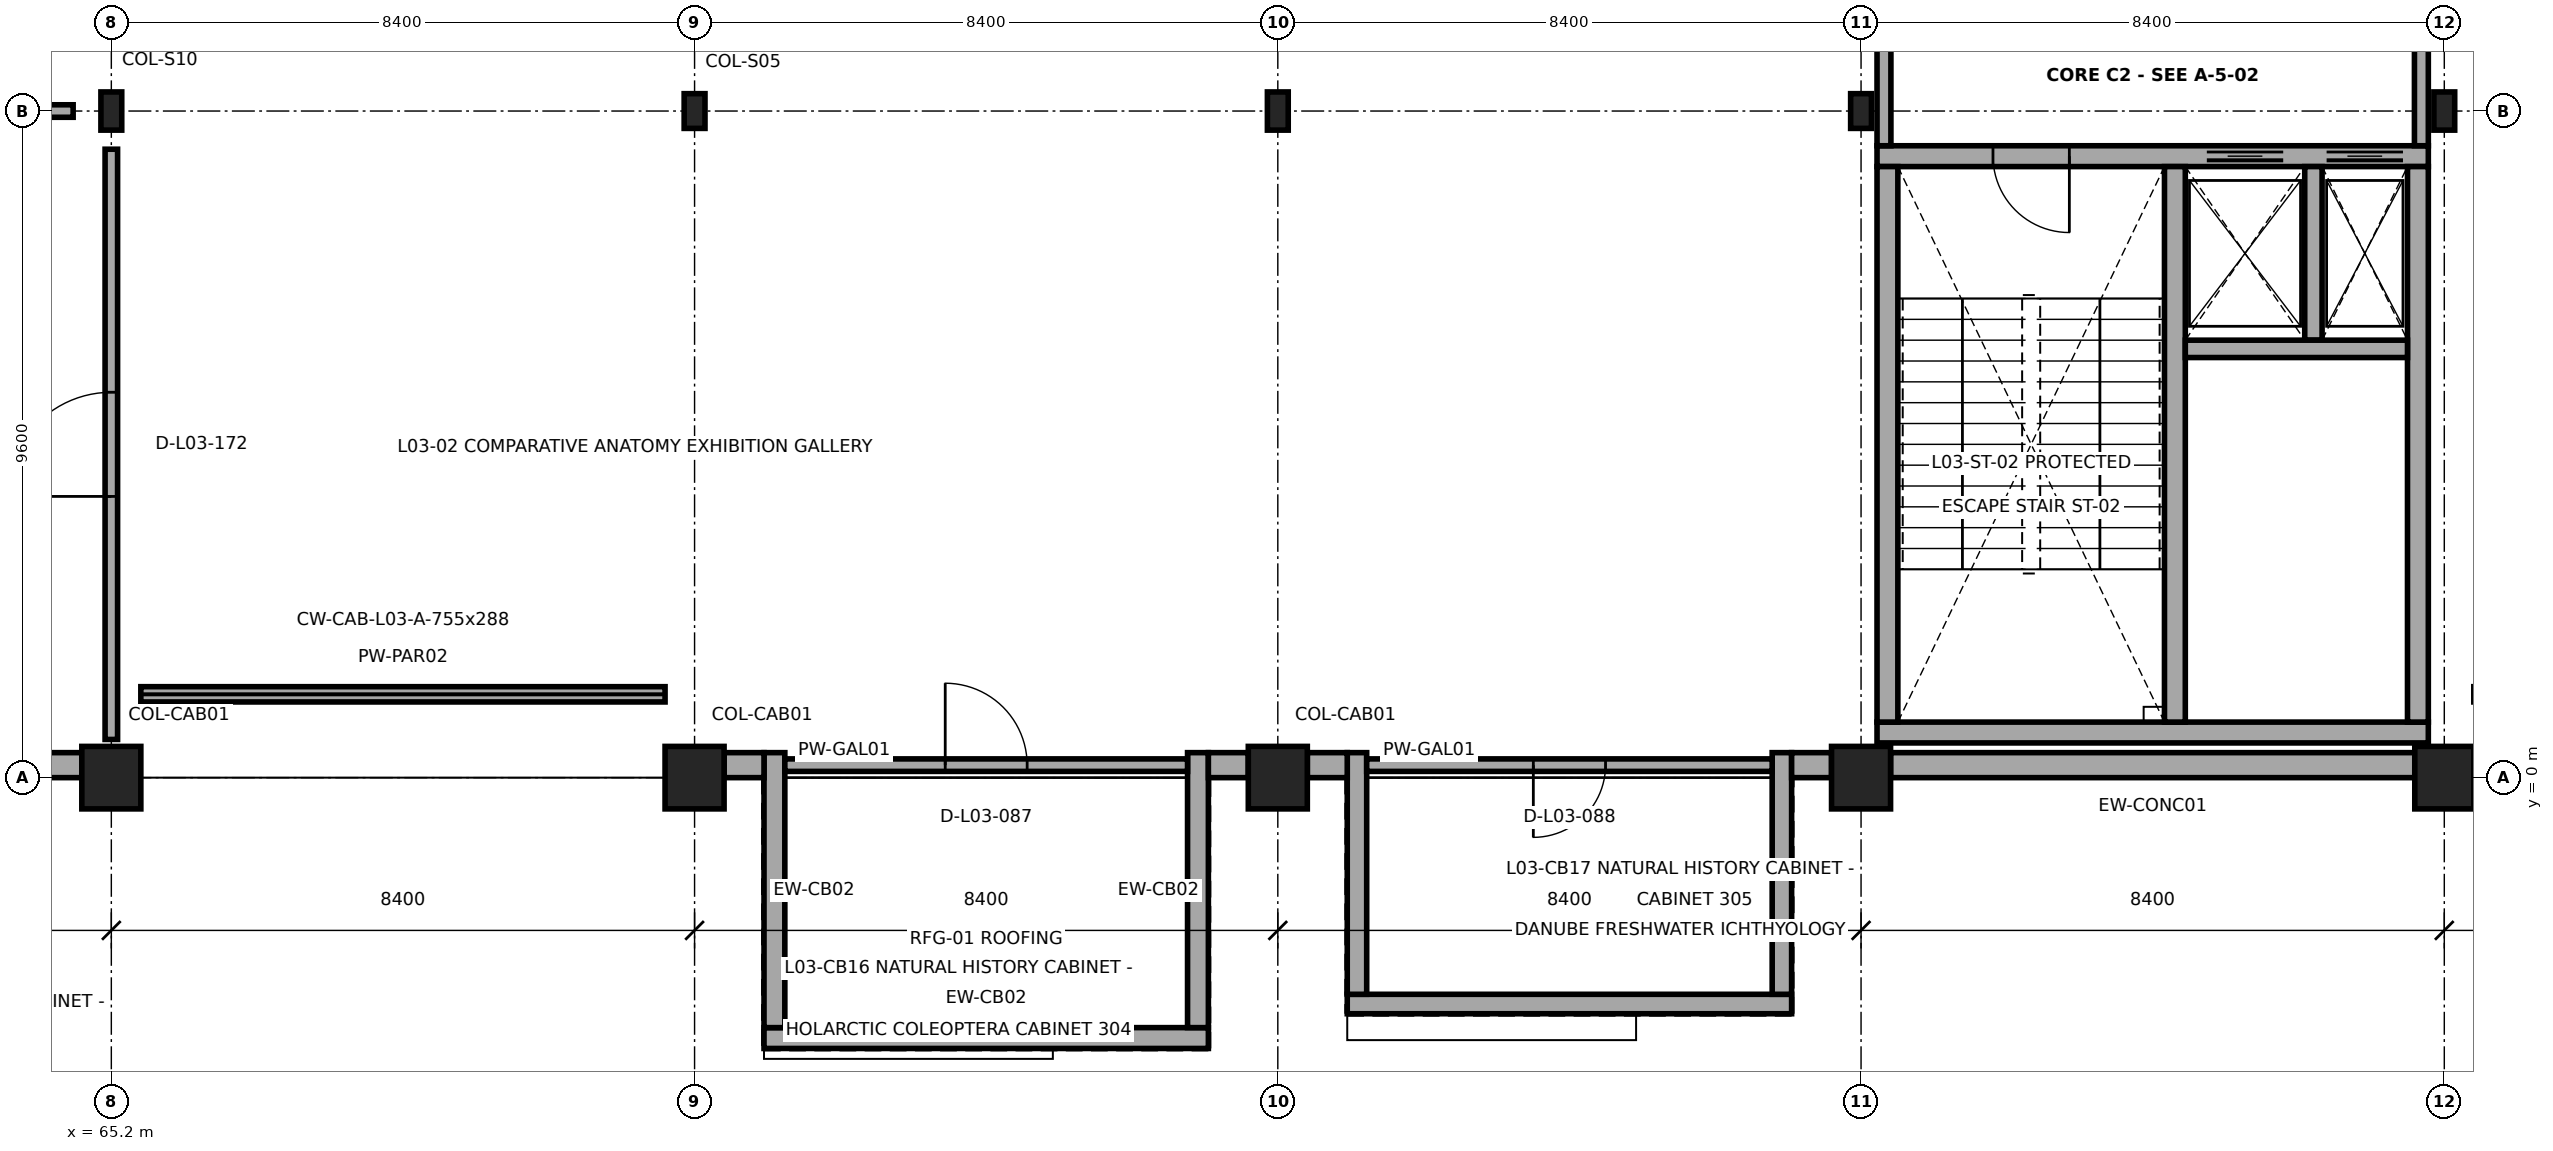
"""IFC4 building model, lengths in metres.
Left out: names, types, materials, properties, quantities, classifications, styles, units other than length and angle.
Written with IfcOpenShell. Run it as: python <this file> out.ifc"""

import sys

from ifc_helpers import new_model, si_unit, direction, frame, frame_2d, origin, origin_2d, place, context, subcontext, project, spatial, rectangle, i_section, extrude, element, fill, save


model = new_model("IFC4")
c1 = context("Model", 3, precision=1e-05, world=origin(), true_north=direction((0.0, 1.0)))
c2 = subcontext(c1, "Body", "Model", "MODEL_VIEW")
j1 = project(units=[si_unit("LENGTHUNIT", "METRE"), si_unit("PLANEANGLEUNIT", "RADIAN")], contexts=[c1])
p1 = place(None, origin())
s1 = spatial("IfcSite", under=j1, at=p1, CompositionType="ELEMENT")
p2 = place(p1, origin())
s2 = spatial("IfcBuilding", under=s1, at=p2, CompositionType="ELEMENT")
p3 = place(p2, frame((0.0, 0.0, 17.4)))
s3 = spatial("IfcBuildingStorey", under=s2, at=p3, CompositionType="ELEMENT", Elevation=17.4)
p4 = place(p3, frame((65.2, 0.0, 0.0), z_axis=(0.0, 0.0, 1.0), x_axis=(1.0, 0.0, 0.0)))
e1 = element("IfcColumn", 1, at=p4, inside=s3, PredefinedType="COLUMN", context=c2, shape_type="SweptSolid", body=[
    extrude(rectangle(XDim=0.85, YDim=0.9, at=origin_2d()), origin(), (0.0, 0.0, 1.0), 4.5),
])
p5 = place(p3, frame((65.2, 9.6, 0.0), z_axis=(0.0, 0.0, 1.0), x_axis=(1.0, 0.0, 0.0)))
e2 = element("IfcColumn", 2, at=p5, inside=s3, PredefinedType="COLUMN", context=c2, shape_type="SweptSolid", body=[
    extrude(i_section(OverallWidth=0.3, OverallDepth=0.55, WebThickness=0.015, FlangeThickness=0.029, FilletRadius=0.027, at=origin_2d()), origin(), (0.0, 0.0, 1.0), 4.5),
])
p6 = place(p3, frame((73.6, 0.0, 0.0), z_axis=(0.0, 0.0, 1.0), x_axis=(1.0, 0.0, 0.0)))
e3 = element("IfcColumn", 3, at=p6, inside=s3, PredefinedType="COLUMN", context=c2, shape_type="SweptSolid", body=[
    extrude(rectangle(XDim=0.85, YDim=0.9, at=origin_2d()), origin(), (0.0, 0.0, 1.0), 4.5),
])
p7 = place(p3, frame((73.6, 9.6, 0.0), z_axis=(0.0, 0.0, 1.0), x_axis=(1.0, 0.0, 0.0)))
e4 = element("IfcColumn", 4, at=p7, inside=s3, PredefinedType="COLUMN", context=c2, shape_type="SweptSolid", body=[
    extrude(i_section(OverallWidth=0.3, OverallDepth=0.5, WebThickness=0.014, FlangeThickness=0.028, FilletRadius=0.027, at=origin_2d()), origin(), (0.0, 0.0, 1.0), 4.5),
])
p8 = place(p3, frame((82.0, 0.0, 0.0), z_axis=(0.0, 0.0, 1.0), x_axis=(1.0, 0.0, 0.0)))
e5 = element("IfcColumn", 5, at=p8, inside=s3, PredefinedType="COLUMN", context=c2, shape_type="SweptSolid", body=[
    extrude(rectangle(XDim=0.85, YDim=0.9, at=origin_2d()), origin(), (0.0, 0.0, 1.0), 4.5),
])
p9 = place(p3, frame((82.0, 9.6, 0.0), z_axis=(0.0, 0.0, 1.0), x_axis=(1.0, 0.0, 0.0)))
e6 = element("IfcColumn", 6, at=p9, inside=s3, PredefinedType="COLUMN", context=c2, shape_type="SweptSolid", body=[
    extrude(i_section(OverallWidth=0.3, OverallDepth=0.55, WebThickness=0.015, FlangeThickness=0.029, FilletRadius=0.027, at=origin_2d()), origin(), (0.0, 0.0, 1.0), 4.5),
])
p10 = place(p3, frame((90.4, 0.0, 0.0), z_axis=(0.0, 0.0, 1.0), x_axis=(1.0, 0.0, 0.0)))
e7 = element("IfcColumn", 7, at=p10, inside=s3, PredefinedType="COLUMN", context=c2, shape_type="SweptSolid", body=[
    extrude(rectangle(XDim=0.85, YDim=0.9, at=origin_2d()), origin(), (0.0, 0.0, 1.0), 4.5),
])
p11 = place(p3, frame((90.4, 9.6, 0.0), z_axis=(0.0, 0.0, 1.0), x_axis=(1.0, 0.0, 0.0)))
e8 = element("IfcColumn", 8, at=p11, inside=s3, PredefinedType="COLUMN", context=c2, shape_type="SweptSolid", body=[
    extrude(i_section(OverallWidth=0.3, OverallDepth=0.5, WebThickness=0.014, FlangeThickness=0.028, FilletRadius=0.027, at=origin_2d()), origin(), (0.0, 0.0, 1.0), 4.5),
])
p12 = place(p3, frame((98.8, 0.0, 0.0), z_axis=(0.0, 0.0, 1.0), x_axis=(1.0, 0.0, 0.0)))
e9 = element("IfcColumn", 9, at=p12, inside=s3, PredefinedType="COLUMN", context=c2, shape_type="SweptSolid", body=[
    extrude(rectangle(XDim=0.85, YDim=0.9, at=origin_2d()), origin(), (0.0, 0.0, 1.0), 4.5),
])
p13 = place(p3, frame((98.8, 9.6, 0.0), z_axis=(0.0, 0.0, 1.0), x_axis=(1.0, 0.0, 0.0)))
e10 = element("IfcColumn", 10, at=p13, inside=s3, PredefinedType="COLUMN", context=c2, shape_type="SweptSolid", body=[
    extrude(i_section(OverallWidth=0.3, OverallDepth=0.55, WebThickness=0.015, FlangeThickness=0.029, FilletRadius=0.027, at=origin_2d()), origin(), (0.0, 0.0, 1.0), 4.5),
])
p14 = place(p3, frame((74.6, -3.75, 0.0), z_axis=(0.0, 0.0, 1.0), x_axis=(1.0, 0.0, 0.0)))
e11 = element("IfcWall", 11, at=p14, inside=s3, PredefinedType="SOLIDWALL", context=c2, shape_type="SweptSolid", body=[
    extrude(rectangle(XDim=6.4, YDim=0.3, at=frame_2d((3.2, 0.0))), origin(), (0.0, 0.0, 1.0), 2.99),
])
for number, where, z_axis, x_axis in (
    (12, (74.75, 0.36, 0.0), (0.0, 0.0, 1.0), (0.0, -1.0, 0.0)),
    (13, (80.85, -3.6, 0.0), (0.0, 0.0, 1.0), (0.0, 1.0, 0.0)),
):
    element("IfcWall", number, at=place(p3, frame(where, z_axis=z_axis, x_axis=x_axis)), inside=s3, PredefinedType="SOLIDWALL", context=c2, shape_type="SweptSolid", body=[
        extrude(rectangle(XDim=3.96, YDim=0.3, at=frame_2d((1.98, 0.0))), origin(), (0.0, 0.0, 1.0), 2.99),
    ])
p15 = place(p3, frame((83.0, -3.26, 0.0), z_axis=(0.0, 0.0, 1.0), x_axis=(1.0, 0.0, 0.0)))
e14 = element("IfcWall", 14, at=p15, inside=s3, PredefinedType="SOLIDWALL", context=c2, shape_type="SweptSolid", body=[
    extrude(rectangle(XDim=6.4, YDim=0.28, at=frame_2d((3.2, 0.0))), origin(), (0.0, 0.0, 1.0), 2.99),
])
for number, where, z_axis, x_axis in (
    (15, (83.14, 0.36, 0.0), (0.0, 0.0, 1.0), (0.0, -1.0, 0.0)),
    (16, (89.26, -3.12, 0.0), (0.0, 0.0, 1.0), (0.0, 1.0, 0.0)),
):
    element("IfcWall", number, at=place(p3, frame(where, z_axis=z_axis, x_axis=x_axis)), inside=s3, PredefinedType="SOLIDWALL", context=c2, shape_type="SweptSolid", body=[
        extrude(rectangle(XDim=3.48, YDim=0.28, at=frame_2d((1.74, 0.0))), origin(), (0.0, 0.0, 1.0), 2.99),
    ])
p16 = place(p3, frame((64.2, 0.18, 0.0), z_axis=(0.0, 0.0, 1.0), x_axis=(1.0, 0.0, 0.0)))
e17 = element("IfcWall", 17, at=p16, inside=s3, PredefinedType="SOLIDWALL", context=c2, shape_type="SweptSolid", body=[
    extrude(rectangle(XDim=0.575, YDim=0.36, at=frame_2d((0.288, 0.0))), origin(), (0.0, 0.0, 1.0), 3.335),
])
p17 = place(p3, frame((65.625, 1.2, -0.002), z_axis=(0.0, 0.0, 1.0), x_axis=(1.0, 0.0, 0.0)))
e18 = element("IfcWall", 18, at=p17, inside=s3, PredefinedType="PARAPET", context=c2, shape_type="SweptSolid", body=[
    extrude(rectangle(XDim=7.55, YDim=0.22, at=frame_2d((3.775, 0.0))), origin(), (0.0, 0.0, 1.0), 0.466),
])
p18 = place(p3, frame((74.025, 0.18, 0.0), z_axis=(0.0, 0.0, 1.0), x_axis=(1.0, 0.0, 0.0)))
e19 = element("IfcWall", 19, at=p18, inside=s3, PredefinedType="SOLIDWALL", context=c2, shape_type="SweptSolid", body=[
    extrude(rectangle(XDim=0.575, YDim=0.36, at=frame_2d((0.288, 0.0))), origin(), (0.0, 0.0, 1.0), 3.335),
])
for number, where, z_axis, x_axis in (
    (20, (81.0, 0.18, 0.0), (0.0, 0.0, 1.0), (1.0, 0.0, 0.0)),
    (21, (82.425, 0.18, 0.0), (0.0, 0.0, 1.0), (1.0, 0.0, 0.0)),
):
    element("IfcWall", number, at=place(p3, frame(where, z_axis=z_axis, x_axis=x_axis)), inside=s3, PredefinedType="SOLIDWALL", context=c2, shape_type="SweptSolid", body=[
        extrude(rectangle(XDim=0.575, YDim=0.36, at=frame_2d((0.288, 0.0))), origin(), (0.0, 0.0, 1.0), 3.335),
    ])
p19 = place(p3, frame((89.4, 0.18, 0.0), z_axis=(0.0, 0.0, 1.0), x_axis=(1.0, 0.0, 0.0)))
e22 = element("IfcWall", 22, at=p19, inside=s3, PredefinedType="SOLIDWALL", context=c2, shape_type="SweptSolid", body=[
    extrude(rectangle(XDim=0.575, YDim=0.36, at=frame_2d((0.288, 0.0))), origin(), (0.0, 0.0, 1.0), 3.335),
])
p20 = place(p3, frame((90.825, 0.18, 0.0), z_axis=(0.0, 0.0, 1.0), x_axis=(1.0, 0.0, 0.0)))
e23 = element("IfcWall", 23, at=p20, inside=s3, PredefinedType="SOLIDWALL", context=c2, shape_type="SweptSolid", body=[
    extrude(rectangle(XDim=7.55, YDim=0.36, at=frame_2d((3.775, 0.0))), origin(), (0.0, 0.0, 1.0), 3.335),
])
p21 = place(p3, frame((90.63, 0.65, 0.0), z_axis=(0.0, 0.0, 1.0), x_axis=(1.0, 0.0, 0.0)))
e24 = element("IfcWall", 24, at=p21, inside=s3, PredefinedType="SHEAR", context=c2, shape_type="SweptSolid", body=[
    extrude(rectangle(XDim=7.94, YDim=0.3, at=frame_2d((3.97, 0.0))), origin(), (0.0, 0.0, 1.0), 4.25),
])
p22 = place(p3, frame((98.57, 8.95, 0.0), z_axis=(0.0, 0.0, 1.0), x_axis=(-1.0, 0.0, 0.0)))
e25 = element("IfcWall", 25, at=p22, inside=s3, PredefinedType="SHEAR", context=c2, shape_type="SweptSolid", body=[
    extrude(rectangle(XDim=7.94, YDim=0.3, at=frame_2d((3.97, 0.0))), origin(), (0.0, 0.0, 1.0), 4.25),
])
p23 = place(p22, frame((5.17, 0.0, 0.0)))
e26 = element("IfcOpeningElement", 26, at=p23, cuts=e25, PredefinedType="OPENING", context=c2, shape_type="SweptSolid", body=[
    extrude(rectangle(XDim=1.1, YDim=2.2, at=frame_2d((0.55, 1.1))), frame((0.0, 0.16, 0.0), z_axis=(0.0, -1.0, 0.0), x_axis=(1.0, 0.0, 0.0)), (0.0, 0.0, 1.0), 0.32),
])
p24 = place(p22, frame((2.09, 0.0, 0.0)))
e27 = element("IfcOpeningElement", 27, at=p24, cuts=e25, PredefinedType="OPENING", context=c2, shape_type="SweptSolid", body=[
    extrude(rectangle(XDim=1.1, YDim=2.1, at=frame_2d((0.55, 1.05))), frame((0.0, 0.16, 0.0), z_axis=(0.0, -1.0, 0.0), x_axis=(1.0, 0.0, 0.0)), (0.0, 0.0, 1.0), 0.32),
])
p25 = place(p22, frame((0.365, 0.0, 0.0)))
e28 = element("IfcOpeningElement", 28, at=p25, cuts=e25, PredefinedType="OPENING", context=c2, shape_type="SweptSolid", body=[
    extrude(rectangle(XDim=1.1, YDim=2.1, at=frame_2d((0.55, 1.05))), frame((0.0, 0.16, 0.0), z_axis=(0.0, -1.0, 0.0), x_axis=(1.0, 0.0, 0.0)), (0.0, 0.0, 1.0), 0.32),
])
for number, where, z_axis, x_axis in (
    (29, (90.78, 8.8, 0.0), (0.0, 0.0, 1.0), (0.0, -1.0, 0.0)),
    (30, (98.42, 0.8, 0.0), (0.0, 0.0, 1.0), (0.0, 1.0, 0.0)),
    (31, (94.92, 0.8, 0.0), (0.0, 0.0, 1.0), (0.0, 1.0, 0.0)),
):
    element("IfcWall", number, at=place(p3, frame(where, z_axis=z_axis, x_axis=x_axis)), inside=s3, PredefinedType="SHEAR", context=c2, shape_type="SweptSolid", body=[
        extrude(rectangle(XDim=8.0, YDim=0.3, at=frame_2d((4.0, 0.0))), origin(), (0.0, 0.0, 1.0), 4.25),
    ])
p26 = place(p3, frame((96.915, 6.3, 0.0), z_axis=(0.0, 0.0, 1.0), x_axis=(0.0, 1.0, 0.0)))
e32 = element("IfcWall", 32, at=p26, inside=s3, PredefinedType="SHEAR", context=c2, shape_type="SweptSolid", body=[
    extrude(rectangle(XDim=2.5, YDim=0.25, at=frame_2d((1.25, 0.0))), origin(), (0.0, 0.0, 1.0), 4.25),
])
p27 = place(p3, frame((95.07, 6.175, 0.0), z_axis=(0.0, 0.0, 1.0), x_axis=(1.0, 0.0, 0.0)))
e33 = element("IfcWall", 33, at=p27, inside=s3, PredefinedType="SHEAR", context=c2, shape_type="SweptSolid", body=[
    extrude(rectangle(XDim=3.2, YDim=0.25, at=frame_2d((1.6, 0.0))), origin(), (0.0, 0.0, 1.0), 4.25),
])
for number, where, z_axis, x_axis in (
    (34, (90.73, 9.1, 0.0), (0.0, 0.0, 1.0), (0.0, 1.0, 0.0)),
    (35, (98.47, 12.0, 0.0), (0.0, 0.0, 1.0), (0.0, -1.0, 0.0)),
):
    element("IfcWall", number, at=place(p3, frame(where, z_axis=z_axis, x_axis=x_axis)), inside=s3, PredefinedType="SOLIDWALL", context=c2, shape_type="SweptSolid", body=[
        extrude(rectangle(XDim=2.9, YDim=0.2, at=frame_2d((1.45, 0.0))), origin(), (0.0, 0.0, 1.0), 3.732),
    ])
p28 = place(p3, frame((74.9, 0.18, 0.0), z_axis=(0.0, 0.0, 1.0), x_axis=(1.0, 0.0, 0.0)))
e36 = element("IfcWall", 36, at=p28, inside=s3, PredefinedType="PARTITIONING", context=c2, shape_type="SweptSolid", body=[
    extrude(rectangle(XDim=5.8, YDim=0.18, at=frame_2d((2.9, 0.0))), origin(), (0.0, 0.0, 1.0), 2.99),
])
p29 = place(p28, frame((2.31, 0.0, 0.0)))
e37 = element("IfcOpeningElement", 37, at=p29, cuts=e36, PredefinedType="OPENING", context=c2, shape_type="SweptSolid", body=[
    extrude(rectangle(XDim=1.18, YDim=2.25, at=frame_2d((0.59, 1.125))), frame((0.0, 0.1, 0.0), z_axis=(0.0, -1.0, 0.0), x_axis=(1.0, 0.0, 0.0)), (0.0, 0.0, 1.0), 0.2),
])
p30 = place(p3, frame((83.28, 0.18, 0.0), z_axis=(0.0, 0.0, 1.0), x_axis=(1.0, 0.0, 0.0)))
e38 = element("IfcWall", 38, at=p30, inside=s3, PredefinedType="PARTITIONING", context=c2, shape_type="SweptSolid", body=[
    extrude(rectangle(XDim=5.84, YDim=0.18, at=frame_2d((2.92, 0.0))), origin(), (0.0, 0.0, 1.0), 2.99),
])
p31 = place(p30, frame((2.4, 0.0, 0.0)))
e39 = element("IfcOpeningElement", 39, at=p31, cuts=e38, PredefinedType="OPENING", context=c2, shape_type="SweptSolid", body=[
    extrude(rectangle(XDim=1.04, YDim=2.18, at=frame_2d((0.52, 1.09))), frame((0.0, 0.1, 0.0), z_axis=(0.0, -1.0, 0.0), x_axis=(1.0, 0.0, 0.0)), (0.0, 0.0, 1.0), 0.2),
])
p32 = place(p3, frame((57.35, 9.6, 0.0), z_axis=(0.0, 0.0, 1.0), x_axis=(1.0, 0.0, 0.0)))
e40 = element("IfcWall", 40, at=p32, inside=s3, PredefinedType="PARTITIONING", context=c2, shape_type="SweptSolid", body=[
    extrude(rectangle(XDim=7.3, YDim=0.18, at=frame_2d((3.65, 0.0))), origin(), (0.0, 0.0, 1.0), 2.992),
])
p33 = place(p32, frame((2.55, 0.0, 0.0)))
e41 = element("IfcOpeningElement", 41, at=p33, cuts=e40, PredefinedType="OPENING", context=c2, shape_type="SweptSolid", body=[
    extrude(rectangle(XDim=2.2, YDim=2.6, at=frame_2d((1.1, 1.3))), frame((0.0, 0.1, 0.0), z_axis=(0.0, -1.0, 0.0), x_axis=(1.0, 0.0, 0.0)), (0.0, 0.0, 1.0), 0.2),
])
p34 = place(p3, frame((65.2, 0.55, 0.0), z_axis=(0.0, 0.0, 1.0), x_axis=(0.0, 1.0, 0.0)))
e42 = element("IfcWall", 42, at=p34, inside=s3, PredefinedType="PARTITIONING", context=c2, shape_type="SweptSolid", body=[
    extrude(rectangle(XDim=8.5, YDim=0.18, at=frame_2d((4.25, 0.0))), origin(), (0.0, 0.0, 1.0), 3.942),
])
p35 = place(p34, frame((3.5, 0.0, 0.0)))
e43 = element("IfcOpeningElement", 43, at=p35, cuts=e42, PredefinedType="OPENING", context=c2, shape_type="SweptSolid", body=[
    extrude(rectangle(XDim=1.5, YDim=2.3, at=frame_2d((0.75, 1.15))), frame((0.0, 0.1, 0.0), z_axis=(0.0, -1.0, 0.0), x_axis=(1.0, 0.0, 0.0)), (0.0, 0.0, 1.0), 0.2),
])
p36 = place(p23, origin())
e44 = element("IfcDoor", 44, at=p36, inside=s3, OperationType="SINGLE_SWING_LEFT", PredefinedType="DOOR", context=c2, shape_type="SweptSolid", body=[
    extrude(rectangle(XDim=1.1, YDim=2.2, at=frame_2d((0.55, 1.1))), frame((0.0, 0.025, 0.0), z_axis=(0.0, -1.0, 0.0), x_axis=(1.0, 0.0, 0.0)), (0.0, 0.0, 1.0), 0.05),
])
fill(e26, e44)
p37 = place(p24, origin())
e45 = element("IfcDoor", 45, at=p37, inside=s3, OperationType="SLIDING_TO_LEFT", PredefinedType="DOOR", context=c2, shape_type="SweptSolid", body=[
    extrude(rectangle(XDim=1.1, YDim=2.1, at=frame_2d((0.55, 1.05))), frame((0.0, 0.025, 0.0), z_axis=(0.0, -1.0, 0.0), x_axis=(1.0, 0.0, 0.0)), (0.0, 0.0, 1.0), 0.05),
])
fill(e27, e45)
p38 = place(p25, origin())
e46 = element("IfcDoor", 46, at=p38, inside=s3, OperationType="SLIDING_TO_LEFT", PredefinedType="DOOR", context=c2, shape_type="SweptSolid", body=[
    extrude(rectangle(XDim=1.1, YDim=2.1, at=frame_2d((0.55, 1.05))), frame((0.0, 0.025, 0.0), z_axis=(0.0, -1.0, 0.0), x_axis=(1.0, 0.0, 0.0)), (0.0, 0.0, 1.0), 0.05),
])
fill(e28, e46)
p39 = place(p29, origin())
e47 = element("IfcDoor", 47, at=p39, inside=s3, OperationType="SINGLE_SWING_LEFT", PredefinedType="DOOR", context=c2, shape_type="SweptSolid", body=[
    extrude(rectangle(XDim=1.18, YDim=2.25, at=frame_2d((0.59, 1.125))), frame((0.0, 0.025, 0.0), z_axis=(0.0, -1.0, 0.0), x_axis=(1.0, 0.0, 0.0)), (0.0, 0.0, 1.0), 0.05),
])
fill(e37, e47)
p40 = place(p31, origin())
e48 = element("IfcDoor", 48, at=p40, inside=s3, OperationType="SINGLE_SWING_RIGHT", PredefinedType="DOOR", context=c2, shape_type="SweptSolid", body=[
    extrude(rectangle(XDim=1.04, YDim=2.18, at=frame_2d((0.52, 1.09))), frame((0.0, 0.025, 0.0), z_axis=(0.0, -1.0, 0.0), x_axis=(1.0, 0.0, 0.0)), (0.0, 0.0, 1.0), 0.05),
])
fill(e39, e48)
p41 = place(p35, origin())
e49 = element("IfcDoor", 49, at=p41, inside=s3, OperationType="SINGLE_SWING_LEFT", PredefinedType="DOOR", context=c2, shape_type="SweptSolid", body=[
    extrude(rectangle(XDim=1.5, YDim=2.3, at=frame_2d((0.75, 1.15))), frame((0.0, 0.025, 0.0), z_axis=(0.0, -1.0, 0.0), x_axis=(1.0, 0.0, 0.0)), (0.0, 0.0, 1.0), 0.05),
])
fill(e43, e49)
save(model, sys.argv[1])
